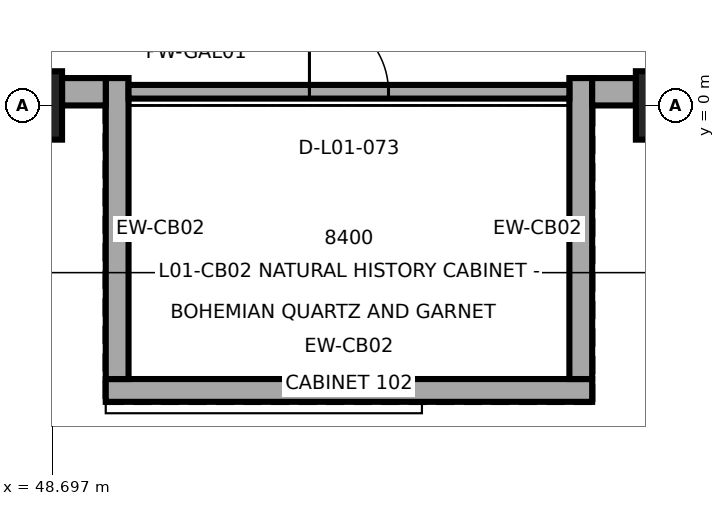
"""IFC4 building model, lengths in metres.
Left out: names, types, materials, properties, quantities, classifications, styles, units other than length and angle.
Written with IfcOpenShell. Run it as: python <this file> out.ifc"""

import sys

from ifc_helpers import new_model, si_unit, direction, frame, frame_2d, origin, origin_2d, place, context, subcontext, project, spatial, rectangle, extrude, element, fill, save


model = new_model("IFC4")
c1 = context("Model", 3, precision=1e-05, world=origin(), true_north=direction((0.0, 1.0)))
c2 = subcontext(c1, "Body", "Model", "MODEL_VIEW")
j1 = project(units=[si_unit("LENGTHUNIT", "METRE"), si_unit("PLANEANGLEUNIT", "RADIAN")], contexts=[c1])
p1 = place(None, origin())
s1 = spatial("IfcSite", under=j1, at=p1, CompositionType="ELEMENT")
p2 = place(p1, origin())
s2 = spatial("IfcBuilding", under=s1, at=p2, CompositionType="ELEMENT")
p3 = place(p2, frame((0.0, 0.0, 8.4)))
s3 = spatial("IfcBuildingStorey", under=s2, at=p3, CompositionType="ELEMENT", Elevation=8.4)
for number, where, z_axis, x_axis in (
    (1, (48.4, 0.0, 0.0), (0.0, 0.0, 1.0), (1.0, 0.0, 0.0)),
    (2, (56.8, 0.0, 0.0), (0.0, 0.0, 1.0), (1.0, 0.0, 0.0)),
):
    element("IfcColumn", number, at=place(p3, frame(where, z_axis=z_axis, x_axis=x_axis)), inside=s3, PredefinedType="COLUMN", context=c2, shape_type="SweptSolid", body=[
        extrude(rectangle(XDim=0.85, YDim=0.9, at=origin_2d()), origin(), (0.0, 0.0, 1.0), 4.5),
    ])
p4 = place(p3, frame((49.4, -3.75, 0.0), z_axis=(0.0, 0.0, 1.0), x_axis=(1.0, 0.0, 0.0)))
e3 = element("IfcWall", 3, at=p4, inside=s3, PredefinedType="SOLIDWALL", context=c2, shape_type="SweptSolid", body=[
    extrude(rectangle(XDim=6.4, YDim=0.3, at=frame_2d((3.2, 0.0))), origin(), (0.0, 0.0, 1.0), 2.99),
])
for number, where, z_axis, x_axis in (
    (4, (49.55, 0.36, 0.0), (0.0, 0.0, 1.0), (0.0, -1.0, 0.0)),
    (5, (55.65, -3.6, 0.0), (0.0, 0.0, 1.0), (0.0, 1.0, 0.0)),
):
    element("IfcWall", number, at=place(p3, frame(where, z_axis=z_axis, x_axis=x_axis)), inside=s3, PredefinedType="SOLIDWALL", context=c2, shape_type="SweptSolid", body=[
        extrude(rectangle(XDim=3.96, YDim=0.3, at=frame_2d((1.98, 0.0))), origin(), (0.0, 0.0, 1.0), 2.99),
    ])
for number, where, z_axis, x_axis in (
    (6, (48.825, 0.18, 0.0), (0.0, 0.0, 1.0), (1.0, 0.0, 0.0)),
    (7, (55.8, 0.18, 0.0), (0.0, 0.0, 1.0), (1.0, 0.0, 0.0)),
):
    element("IfcWall", number, at=place(p3, frame(where, z_axis=z_axis, x_axis=x_axis)), inside=s3, PredefinedType="SOLIDWALL", context=c2, shape_type="SweptSolid", body=[
        extrude(rectangle(XDim=0.575, YDim=0.36, at=frame_2d((0.288, 0.0))), origin(), (0.0, 0.0, 1.0), 3.335),
    ])
p5 = place(p3, frame((49.7, 0.18, 0.0), z_axis=(0.0, 0.0, 1.0), x_axis=(1.0, 0.0, 0.0)))
e8 = element("IfcWall", 8, at=p5, inside=s3, PredefinedType="PARTITIONING", context=c2, shape_type="SweptSolid", body=[
    extrude(rectangle(XDim=5.8, YDim=0.18, at=frame_2d((2.9, 0.0))), origin(), (0.0, 0.0, 1.0), 2.99),
])
p6 = place(p5, frame((2.38, 0.0, 0.0)))
e9 = element("IfcOpeningElement", 9, at=p6, cuts=e8, PredefinedType="OPENING", context=c2, shape_type="SweptSolid", body=[
    extrude(rectangle(XDim=1.04, YDim=2.18, at=frame_2d((0.52, 1.09))), frame((0.0, 0.1, 0.0), z_axis=(0.0, -1.0, 0.0), x_axis=(1.0, 0.0, 0.0)), (0.0, 0.0, 1.0), 0.2),
])
p7 = place(p6, origin())
e10 = element("IfcDoor", 10, at=p7, inside=s3, OperationType="SINGLE_SWING_LEFT", PredefinedType="DOOR", context=c2, shape_type="SweptSolid", body=[
    extrude(rectangle(XDim=1.04, YDim=2.18, at=frame_2d((0.52, 1.09))), frame((0.0, 0.025, 0.0), z_axis=(0.0, -1.0, 0.0), x_axis=(1.0, 0.0, 0.0)), (0.0, 0.0, 1.0), 0.05),
])
fill(e9, e10)
save(model, sys.argv[1])
